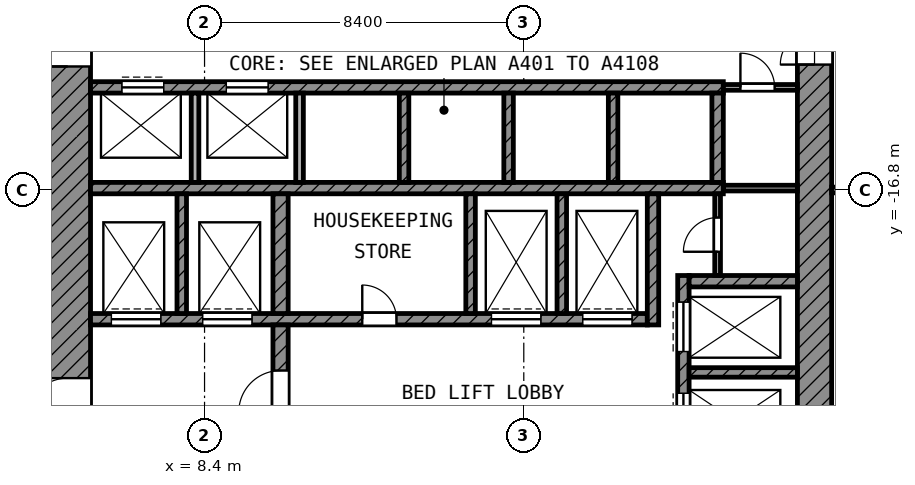
"""IFC4 building model, lengths in metres.
Left out: names, types, materials, properties, quantities, classifications, styles, units other than length and angle.
Written with IfcOpenShell. Run it as: python <this file> out.ifc"""

import sys

from ifc_helpers import new_model, si_unit, direction, frame, frame_2d, origin, place, context, subcontext, project, spatial, rectangle, extrude, element, fill, save


model = new_model("IFC4")
c1 = context("Model", 3, precision=1e-05, world=origin(), true_north=direction((0.0, 1.0)))
c2 = subcontext(c1, "Body", "Model", "MODEL_VIEW")
j1 = project(units=[si_unit("LENGTHUNIT", "METRE"), si_unit("PLANEANGLEUNIT", "RADIAN")], contexts=[c1])
p1 = place(None, origin())
s1 = spatial("IfcSite", under=j1, at=p1, CompositionType="ELEMENT")
p2 = place(p1, origin())
s2 = spatial("IfcBuilding", under=s1, at=p2, CompositionType="ELEMENT")
p3 = place(p2, frame((0.0, 0.0, 183.6)))
s3 = spatial("IfcBuildingStorey", under=s2, at=p3, CompositionType="ELEMENT", Elevation=183.6)
p4 = place(p3, frame((4.8, -24.9, 0.0), z_axis=(0.0, 0.0, 1.0), x_axis=(0.0, 1.0, 0.0)))
e1 = element("IfcWall", 1, at=p4, inside=s3, PredefinedType="SHEAR", context=c2, shape_type="SweptSolid", body=[
    extrude(rectangle(XDim=19.5, YDim=1.2, at=frame_2d((9.75, 0.0))), origin(), (0.0, 0.0, 1.0), 3.6),
])
p5 = place(p4, frame((11.35, 0.0, 0.0)))
e2 = element("IfcOpeningElement", 2, at=p5, cuts=e1, PredefinedType="OPENING", context=c2, shape_type="SweptSolid", body=[
    extrude(rectangle(XDim=1.1, YDim=2.1, at=frame_2d((0.55, 1.05))), frame((0.0, 0.61, 0.0), z_axis=(0.0, -1.0, 0.0), x_axis=(1.0, 0.0, 0.0)), (0.0, 0.0, 1.0), 1.22),
])
p6 = place(p4, frame((2.05, 0.0, 0.0)))
e3 = element("IfcOpeningElement", 3, at=p6, cuts=e1, PredefinedType="OPENING", context=c2, shape_type="SweptSolid", body=[
    extrude(rectangle(XDim=1.1, YDim=2.1, at=frame_2d((0.55, 1.05))), frame((0.0, 0.61, 0.0), z_axis=(0.0, -1.0, 0.0), x_axis=(1.0, 0.0, 0.0)), (0.0, 0.0, 1.0), 1.22),
])
p7 = place(p3, frame((24.45, -24.0, 0.0), z_axis=(0.0, 0.0, 1.0), x_axis=(0.0, 1.0, 0.0)))
e4 = element("IfcWall", 4, at=p7, inside=s3, PredefinedType="SHEAR", context=c2, shape_type="SweptSolid", body=[
    extrude(rectangle(XDim=18.6, YDim=0.9, at=frame_2d((9.3, 0.0))), origin(), (0.0, 0.0, 1.0), 3.6),
])
p8 = place(p7, frame((10.5, 0.0, 0.0)))
e5 = element("IfcOpeningElement", 5, at=p8, cuts=e4, PredefinedType="OPENING", context=c2, shape_type="SweptSolid", body=[
    extrude(rectangle(XDim=1.8, YDim=2.1, at=frame_2d((0.9, 1.05))), frame((0.0, 0.46, 0.0), z_axis=(0.0, -1.0, 0.0), x_axis=(1.0, 0.0, 0.0)), (0.0, 0.0, 1.0), 0.92),
])
p9 = place(p3, frame((5.4, -14.1, 0.0), z_axis=(0.0, 0.0, 1.0), x_axis=(1.0, 0.0, 0.0)))
e6 = element("IfcWall", 6, at=p9, inside=s3, PredefinedType="SHEAR", context=c2, shape_type="SweptSolid", body=[
    extrude(rectangle(XDim=16.65, YDim=0.3, at=frame_2d((8.325, 0.0))), origin(), (0.0, 0.0, 1.0), 3.6),
])
p10 = place(p9, frame((0.825, 0.0, 0.0)))
e7 = element("IfcOpeningElement", 7, at=p10, cuts=e6, PredefinedType="OPENING", context=c2, shape_type="SweptSolid", body=[
    extrude(rectangle(XDim=1.1, YDim=2.1, at=frame_2d((0.55, 1.05))), frame((0.0, 0.16, 0.0), z_axis=(0.0, -1.0, 0.0), x_axis=(1.0, 0.0, 0.0)), (0.0, 0.0, 1.0), 0.32),
])
p11 = place(p9, frame((3.575, 0.0, 0.0)))
e8 = element("IfcOpeningElement", 8, at=p11, cuts=e6, PredefinedType="OPENING", context=c2, shape_type="SweptSolid", body=[
    extrude(rectangle(XDim=1.1, YDim=2.1, at=frame_2d((0.55, 1.05))), frame((0.0, 0.16, 0.0), z_axis=(0.0, -1.0, 0.0), x_axis=(1.0, 0.0, 0.0)), (0.0, 0.0, 1.0), 0.32),
])
p12 = place(p3, frame((5.4, -16.75, 0.0), z_axis=(0.0, 0.0, 1.0), x_axis=(1.0, 0.0, 0.0)))
e9 = element("IfcWall", 9, at=p12, inside=s3, PredefinedType="SHEAR", context=c2, shape_type="SweptSolid", body=[
    extrude(rectangle(XDim=16.65, YDim=0.3, at=frame_2d((8.325, 0.0))), origin(), (0.0, 0.0, 1.0), 3.6),
])
p13 = place(p3, frame((5.4, -20.2, 0.0), z_axis=(0.0, 0.0, 1.0), x_axis=(1.0, 0.0, 0.0)))
e10 = element("IfcWall", 10, at=p13, inside=s3, PredefinedType="SHEAR", context=c2, shape_type="SweptSolid", body=[
    extrude(rectangle(XDim=14.65, YDim=0.3, at=frame_2d((7.325, 0.0))), origin(), (0.0, 0.0, 1.0), 3.6),
])
p14 = place(p13, frame((10.55, 0.0, 0.0)))
e11 = element("IfcOpeningElement", 11, at=p14, cuts=e10, PredefinedType="OPENING", context=c2, shape_type="SweptSolid", body=[
    extrude(rectangle(XDim=1.3, YDim=2.1, at=frame_2d((0.65, 1.05))), frame((0.0, 0.16, 0.0), z_axis=(0.0, -1.0, 0.0), x_axis=(1.0, 0.0, 0.0)), (0.0, 0.0, 1.0), 0.32),
])
p15 = place(p13, frame((12.95, 0.0, 0.0)))
e12 = element("IfcOpeningElement", 12, at=p15, cuts=e10, PredefinedType="OPENING", context=c2, shape_type="SweptSolid", body=[
    extrude(rectangle(XDim=1.3, YDim=2.1, at=frame_2d((0.65, 1.05))), frame((0.0, 0.16, 0.0), z_axis=(0.0, -1.0, 0.0), x_axis=(1.0, 0.0, 0.0)), (0.0, 0.0, 1.0), 0.32),
])
p16 = place(p13, frame((0.55, 0.0, 0.0)))
e13 = element("IfcOpeningElement", 13, at=p16, cuts=e10, PredefinedType="OPENING", context=c2, shape_type="SweptSolid", body=[
    extrude(rectangle(XDim=1.3, YDim=2.1, at=frame_2d((0.65, 1.05))), frame((0.0, 0.16, 0.0), z_axis=(0.0, -1.0, 0.0), x_axis=(1.0, 0.0, 0.0)), (0.0, 0.0, 1.0), 0.32),
])
p17 = place(p13, frame((2.95, 0.0, 0.0)))
e14 = element("IfcOpeningElement", 14, at=p17, cuts=e10, PredefinedType="OPENING", context=c2, shape_type="SweptSolid", body=[
    extrude(rectangle(XDim=1.3, YDim=2.1, at=frame_2d((0.65, 1.05))), frame((0.0, 0.16, 0.0), z_axis=(0.0, -1.0, 0.0), x_axis=(1.0, 0.0, 0.0)), (0.0, 0.0, 1.0), 0.32),
])
p18 = place(p13, frame((7.15, 0.0, 0.0)))
e15 = element("IfcOpeningElement", 15, at=p18, cuts=e10, PredefinedType="OPENING", context=c2, shape_type="SweptSolid", body=[
    extrude(rectangle(XDim=0.9, YDim=2.1, at=frame_2d((0.45, 1.05))), frame((0.0, 0.16, 0.0), z_axis=(0.0, -1.0, 0.0), x_axis=(1.0, 0.0, 0.0)), (0.0, 0.0, 1.0), 0.32),
])
p19 = place(p3, frame((10.4, -24.0, 0.0), z_axis=(0.0, 0.0, 1.0), x_axis=(0.0, 1.0, 0.0)))
e16 = element("IfcWall", 16, at=p19, inside=s3, PredefinedType="SHEAR", context=c2, shape_type="SweptSolid", body=[
    extrude(rectangle(XDim=3.65, YDim=0.4, at=frame_2d((1.825, 0.0))), origin(), (0.0, 0.0, 1.0), 3.6),
])
p20 = place(p19, frame((1.35, 0.0, 0.0)))
e17 = element("IfcOpeningElement", 17, at=p20, cuts=e16, PredefinedType="OPENING", context=c2, shape_type="SweptSolid", body=[
    extrude(rectangle(XDim=1.1, YDim=2.1, at=frame_2d((0.55, 1.05))), frame((0.0, 0.21, 0.0), z_axis=(0.0, -1.0, 0.0), x_axis=(1.0, 0.0, 0.0)), (0.0, 0.0, 1.0), 0.42),
])
p21 = place(p3, frame((10.4, -20.05, 0.0), z_axis=(0.0, 0.0, 1.0), x_axis=(0.0, 1.0, 0.0)))
e18 = element("IfcWall", 18, at=p21, inside=s3, PredefinedType="SHEAR", context=c2, shape_type="SweptSolid", body=[
    extrude(rectangle(XDim=3.15, YDim=0.4, at=frame_2d((1.575, 0.0))), origin(), (0.0, 0.0, 1.0), 3.6),
])
p22 = place(p3, frame((20.2, -20.35, 0.0), z_axis=(0.0, 0.0, 1.0), x_axis=(0.0, 1.0, 0.0)))
e19 = element("IfcWall", 19, at=p22, inside=s3, PredefinedType="SHEAR", context=c2, shape_type="SweptSolid", body=[
    extrude(rectangle(XDim=3.45, YDim=0.3, at=frame_2d((1.725, 0.0))), origin(), (0.0, 0.0, 1.0), 3.6),
])
p23 = place(p3, frame((21.9, -16.6, 0.0), z_axis=(0.0, 0.0, 1.0), x_axis=(0.0, 1.0, 0.0)))
e20 = element("IfcWall", 20, at=p23, inside=s3, PredefinedType="SHEAR", context=c2, shape_type="SweptSolid", body=[
    extrude(rectangle(XDim=2.35, YDim=0.3, at=frame_2d((1.175, 0.0))), origin(), (0.0, 0.0, 1.0), 3.6),
])
p24 = place(p3, frame((21.15, -19.2, 0.0), z_axis=(0.0, 0.0, 1.0), x_axis=(1.0, 0.0, 0.0)))
e21 = element("IfcWall", 21, at=p24, inside=s3, PredefinedType="SHEAR", context=c2, shape_type="SweptSolid", body=[
    extrude(rectangle(XDim=2.85, YDim=0.3, at=frame_2d((1.425, 0.0))), origin(), (0.0, 0.0, 1.0), 3.6),
])
p25 = place(p3, frame((21.0, -24.0, 0.0), z_axis=(0.0, 0.0, 1.0), x_axis=(0.0, 1.0, 0.0)))
e22 = element("IfcWall", 22, at=p25, inside=s3, PredefinedType="SHEAR", context=c2, shape_type="SweptSolid", body=[
    extrude(rectangle(XDim=4.95, YDim=0.3, at=frame_2d((2.475, 0.0))), origin(), (0.0, 0.0, 1.0), 3.6),
])
p26 = place(p25, frame((2.95, 0.0, 0.0)))
e23 = element("IfcOpeningElement", 23, at=p26, cuts=e22, PredefinedType="OPENING", context=c2, shape_type="SweptSolid", body=[
    extrude(rectangle(XDim=1.3, YDim=2.1, at=frame_2d((0.65, 1.05))), frame((0.0, 0.16, 0.0), z_axis=(0.0, -1.0, 0.0), x_axis=(1.0, 0.0, 0.0)), (0.0, 0.0, 1.0), 0.32),
])
p27 = place(p25, frame((0.55, 0.0, 0.0)))
e24 = element("IfcOpeningElement", 24, at=p27, cuts=e22, PredefinedType="OPENING", context=c2, shape_type="SweptSolid", body=[
    extrude(rectangle(XDim=1.3, YDim=2.1, at=frame_2d((0.65, 1.05))), frame((0.0, 0.16, 0.0), z_axis=(0.0, -1.0, 0.0), x_axis=(1.0, 0.0, 0.0)), (0.0, 0.0, 1.0), 0.32),
])
p28 = place(p3, frame((21.15, -21.6, 0.0), z_axis=(0.0, 0.0, 1.0), x_axis=(1.0, 0.0, 0.0)))
e25 = element("IfcWall", 25, at=p28, inside=s3, PredefinedType="SHEAR", context=c2, shape_type="SweptSolid", body=[
    extrude(rectangle(XDim=2.85, YDim=0.25, at=frame_2d((1.425, 0.0))), origin(), (0.0, 0.0, 1.0), 3.6),
])
for number, where, z_axis, x_axis in (
    (26, (7.8, -20.05, 0.0), (0.0, 0.0, 1.0), (0.0, 1.0, 0.0)),
    (27, (15.4, -20.05, 0.0), (0.0, 0.0, 1.0), (0.0, 1.0, 0.0)),
    (28, (17.8, -20.05, 0.0), (0.0, 0.0, 1.0), (0.0, 1.0, 0.0)),
):
    element("IfcWall", number, at=place(p3, frame(where, z_axis=z_axis, x_axis=x_axis)), inside=s3, PredefinedType="SHEAR", context=c2, shape_type="SweptSolid", body=[
        extrude(rectangle(XDim=3.15, YDim=0.25, at=frame_2d((1.575, 0.0))), origin(), (0.0, 0.0, 1.0), 3.6),
    ])
for number, where, z_axis, x_axis in (
    (29, (8.15, -16.6, 0.0), (0.0, 0.0, 1.0), (0.0, 1.0, 0.0)),
    (30, (10.9, -16.6, 0.0), (0.0, 0.0, 1.0), (0.0, 1.0, 0.0)),
):
    element("IfcWall", number, at=place(p3, frame(where, z_axis=z_axis, x_axis=x_axis)), inside=s3, PredefinedType="PARTITIONING", context=c2, shape_type="SweptSolid", body=[
        extrude(rectangle(XDim=2.35, YDim=0.2, at=frame_2d((1.175, 0.0))), origin(), (0.0, 0.0, 1.0), 3.6),
    ])
for number, where, z_axis, x_axis in (
    (31, (13.65, -16.6, 0.0), (0.0, 0.0, 1.0), (0.0, 1.0, 0.0)),
    (32, (16.4, -16.6, 0.0), (0.0, 0.0, 1.0), (0.0, 1.0, 0.0)),
    (33, (19.15, -16.6, 0.0), (0.0, 0.0, 1.0), (0.0, 1.0, 0.0)),
):
    element("IfcWall", number, at=place(p3, frame(where, z_axis=z_axis, x_axis=x_axis)), inside=s3, PredefinedType="SHEAR", context=c2, shape_type="SweptSolid", body=[
        extrude(rectangle(XDim=2.35, YDim=0.25, at=frame_2d((1.175, 0.0))), origin(), (0.0, 0.0, 1.0), 3.6),
    ])
p29 = place(p3, frame((21.9, -19.05, 0.0), z_axis=(0.0, 0.0, 1.0), x_axis=(0.0, 1.0, 0.0)))
e34 = element("IfcWall", 34, at=p29, inside=s3, PredefinedType="PARTITIONING", context=c2, shape_type="SweptSolid", body=[
    extrude(rectangle(XDim=2.15, YDim=0.15, at=frame_2d((1.075, 0.0))), origin(), (0.0, 0.0, 1.0), 3.6),
])
p30 = place(p29, frame((0.625, 0.0, 0.0)))
e35 = element("IfcOpeningElement", 35, at=p30, cuts=e34, PredefinedType="OPENING", context=c2, shape_type="SweptSolid", body=[
    extrude(rectangle(XDim=0.9, YDim=2.1, at=frame_2d((0.45, 1.05))), frame((0.0, 0.085, 0.0), z_axis=(0.0, -1.0, 0.0), x_axis=(1.0, 0.0, 0.0)), (0.0, 0.0, 1.0), 0.17),
])
p31 = place(p3, frame((22.05, -16.75, 0.0), z_axis=(0.0, 0.0, 1.0), x_axis=(1.0, 0.0, 0.0)))
e36 = element("IfcWall", 36, at=p31, inside=s3, PredefinedType="PARTITIONING", context=c2, shape_type="SweptSolid", body=[
    extrude(rectangle(XDim=1.95, YDim=0.15, at=frame_2d((0.975, 0.0))), origin(), (0.0, 0.0, 1.0), 3.6),
])
p32 = place(p3, frame((22.05, -14.1, 0.0), z_axis=(0.0, 0.0, 1.0), x_axis=(1.0, 0.0, 0.0)))
e37 = element("IfcWall", 37, at=p32, inside=s3, PredefinedType="PARTITIONING", context=c2, shape_type="SweptSolid", body=[
    extrude(rectangle(XDim=1.95, YDim=0.15, at=frame_2d((0.975, 0.0))), origin(), (0.0, 0.0, 1.0), 3.6),
])
p33 = place(p32, frame((0.45, 0.0, 0.0)))
e38 = element("IfcOpeningElement", 38, at=p33, cuts=e37, PredefinedType="OPENING", context=c2, shape_type="SweptSolid", body=[
    extrude(rectangle(XDim=0.9, YDim=2.1, at=frame_2d((0.45, 1.05))), frame((0.0, 0.085, 0.0), z_axis=(0.0, -1.0, 0.0), x_axis=(1.0, 0.0, 0.0)), (0.0, 0.0, 1.0), 0.17),
])
p34 = place(p3, frame((24.9, -16.8, 0.0), z_axis=(0.0, 0.0, 1.0), x_axis=(1.0, 0.0, 0.0)))
e39 = element("IfcWall", 39, at=p34, inside=s3, PredefinedType="PARTITIONING", context=c2, shape_type="SweptSolid", body=[
    extrude(rectangle(XDim=42.22, YDim=0.15, at=frame_2d((21.11, 0.0))), origin(), (0.0, 0.0, 1.0), 3.6),
])
p35 = place(p34, frame((1.65, 0.0, 0.0)))
e40 = element("IfcOpeningElement", 40, at=p35, cuts=e39, PredefinedType="OPENING", context=c2, shape_type="SweptSolid", body=[
    extrude(rectangle(XDim=1.5, YDim=2.1, at=frame_2d((0.75, 1.05))), frame((0.0, 0.085, 0.0), z_axis=(0.0, -1.0, 0.0), x_axis=(1.0, 0.0, 0.0)), (0.0, 0.0, 1.0), 0.17),
])
p36 = place(p34, frame((6.1, 0.0, 0.0)))
e41 = element("IfcOpeningElement", 41, at=p36, cuts=e39, PredefinedType="OPENING", context=c2, shape_type="SweptSolid", body=[
    extrude(rectangle(XDim=1.0, YDim=2.1, at=frame_2d((0.5, 1.05))), frame((0.0, 0.085, 0.0), z_axis=(0.0, -1.0, 0.0), x_axis=(1.0, 0.0, 0.0)), (0.0, 0.0, 1.0), 0.17),
])
p37 = place(p34, frame((10.2, 0.0, 0.0)))
e42 = element("IfcOpeningElement", 42, at=p37, cuts=e39, PredefinedType="OPENING", context=c2, shape_type="SweptSolid", body=[
    extrude(rectangle(XDim=1.2, YDim=2.1, at=frame_2d((0.6, 1.05))), frame((0.0, 0.085, 0.0), z_axis=(0.0, -1.0, 0.0), x_axis=(1.0, 0.0, 0.0)), (0.0, 0.0, 1.0), 0.17),
])
p38 = place(p34, frame((20.34, 0.0, 0.0)))
e43 = element("IfcOpeningElement", 43, at=p38, cuts=e39, PredefinedType="OPENING", context=c2, shape_type="SweptSolid", body=[
    extrude(rectangle(XDim=1.2, YDim=2.1, at=frame_2d((0.6, 1.05))), frame((0.0, 0.085, 0.0), z_axis=(0.0, -1.0, 0.0), x_axis=(1.0, 0.0, 0.0)), (0.0, 0.0, 1.0), 0.17),
])
p39 = place(p34, frame((18.78, 0.0, 0.0)))
e44 = element("IfcOpeningElement", 44, at=p39, cuts=e39, PredefinedType="OPENING", context=c2, shape_type="SweptSolid", body=[
    extrude(rectangle(XDim=1.2, YDim=2.1, at=frame_2d((0.6, 1.05))), frame((0.0, 0.085, 0.0), z_axis=(0.0, -1.0, 0.0), x_axis=(1.0, 0.0, 0.0)), (0.0, 0.0, 1.0), 0.17),
])
p40 = place(p34, frame((28.0, 0.0, 0.0)))
e45 = element("IfcOpeningElement", 45, at=p40, cuts=e39, PredefinedType="OPENING", context=c2, shape_type="SweptSolid", body=[
    extrude(rectangle(XDim=1.2, YDim=2.1, at=frame_2d((0.6, 1.05))), frame((0.0, 0.085, 0.0), z_axis=(0.0, -1.0, 0.0), x_axis=(1.0, 0.0, 0.0)), (0.0, 0.0, 1.0), 0.17),
])
p41 = place(p34, frame((26.48, 0.0, 0.0)))
e46 = element("IfcOpeningElement", 46, at=p41, cuts=e39, PredefinedType="OPENING", context=c2, shape_type="SweptSolid", body=[
    extrude(rectangle(XDim=1.2, YDim=2.1, at=frame_2d((0.6, 1.05))), frame((0.0, 0.085, 0.0), z_axis=(0.0, -1.0, 0.0), x_axis=(1.0, 0.0, 0.0)), (0.0, 0.0, 1.0), 0.17),
])
p42 = place(p34, frame((32.1, 0.0, 0.0)))
e47 = element("IfcOpeningElement", 47, at=p42, cuts=e39, PredefinedType="OPENING", context=c2, shape_type="SweptSolid", body=[
    extrude(rectangle(XDim=1.2, YDim=2.1, at=frame_2d((0.6, 1.05))), frame((0.0, 0.085, 0.0), z_axis=(0.0, -1.0, 0.0), x_axis=(1.0, 0.0, 0.0)), (0.0, 0.0, 1.0), 0.17),
])
p43 = place(p34, frame((37.35, 0.0, 0.0)))
e48 = element("IfcOpeningElement", 48, at=p43, cuts=e39, PredefinedType="OPENING", context=c2, shape_type="SweptSolid", body=[
    extrude(rectangle(XDim=1.5, YDim=2.1, at=frame_2d((0.75, 1.05))), frame((0.0, 0.085, 0.0), z_axis=(0.0, -1.0, 0.0), x_axis=(1.0, 0.0, 0.0)), (0.0, 0.0, 1.0), 0.17),
])
p44 = place(p10, origin())
e49 = element("IfcDoor", 49, at=p44, inside=s3, OperationType="DOUBLE_DOOR_SLIDING", PredefinedType="DOOR", context=c2, shape_type="SweptSolid", body=[
    extrude(rectangle(XDim=1.1, YDim=2.1, at=frame_2d((0.55, 1.05))), frame((0.0, 0.025, 0.0), z_axis=(0.0, -1.0, 0.0), x_axis=(1.0, 0.0, 0.0)), (0.0, 0.0, 1.0), 0.05),
])
fill(e7, e49)
p45 = place(p11, origin())
e50 = element("IfcDoor", 50, at=p45, inside=s3, OperationType="DOUBLE_DOOR_SLIDING", PredefinedType="DOOR", context=c2, shape_type="SweptSolid", body=[
    extrude(rectangle(XDim=1.1, YDim=2.1, at=frame_2d((0.55, 1.05))), frame((0.0, 0.025, 0.0), z_axis=(0.0, -1.0, 0.0), x_axis=(1.0, 0.0, 0.0)), (0.0, 0.0, 1.0), 0.05),
])
fill(e8, e50)
p46 = place(p26, origin())
e51 = element("IfcDoor", 51, at=p46, inside=s3, OperationType="DOUBLE_DOOR_SLIDING", PredefinedType="DOOR", context=c2, shape_type="SweptSolid", body=[
    extrude(rectangle(XDim=1.3, YDim=2.1, at=frame_2d((0.65, 1.05))), frame((0.0, 0.025, 0.0), z_axis=(0.0, -1.0, 0.0), x_axis=(1.0, 0.0, 0.0)), (0.0, 0.0, 1.0), 0.05),
])
fill(e23, e51)
p47 = place(p27, origin())
e52 = element("IfcDoor", 52, at=p47, inside=s3, OperationType="DOUBLE_DOOR_SLIDING", PredefinedType="DOOR", context=c2, shape_type="SweptSolid", body=[
    extrude(rectangle(XDim=1.3, YDim=2.1, at=frame_2d((0.65, 1.05))), frame((0.0, 0.025, 0.0), z_axis=(0.0, -1.0, 0.0), x_axis=(1.0, 0.0, 0.0)), (0.0, 0.0, 1.0), 0.05),
])
fill(e24, e52)
p48 = place(p14, origin())
e53 = element("IfcDoor", 53, at=p48, inside=s3, OperationType="DOUBLE_DOOR_SLIDING", PredefinedType="DOOR", context=c2, shape_type="SweptSolid", body=[
    extrude(rectangle(XDim=1.3, YDim=2.1, at=frame_2d((0.65, 1.05))), frame((0.0, 0.025, 0.0), z_axis=(0.0, -1.0, 0.0), x_axis=(1.0, 0.0, 0.0)), (0.0, 0.0, 1.0), 0.05),
])
fill(e11, e53)
p49 = place(p15, origin())
e54 = element("IfcDoor", 54, at=p49, inside=s3, OperationType="DOUBLE_DOOR_SLIDING", PredefinedType="DOOR", context=c2, shape_type="SweptSolid", body=[
    extrude(rectangle(XDim=1.3, YDim=2.1, at=frame_2d((0.65, 1.05))), frame((0.0, 0.025, 0.0), z_axis=(0.0, -1.0, 0.0), x_axis=(1.0, 0.0, 0.0)), (0.0, 0.0, 1.0), 0.05),
])
fill(e12, e54)
p50 = place(p16, origin())
e55 = element("IfcDoor", 55, at=p50, inside=s3, OperationType="DOUBLE_DOOR_SLIDING", PredefinedType="DOOR", context=c2, shape_type="SweptSolid", body=[
    extrude(rectangle(XDim=1.3, YDim=2.1, at=frame_2d((0.65, 1.05))), frame((0.0, 0.025, 0.0), z_axis=(0.0, -1.0, 0.0), x_axis=(1.0, 0.0, 0.0)), (0.0, 0.0, 1.0), 0.05),
])
fill(e13, e55)
p51 = place(p17, origin())
e56 = element("IfcDoor", 56, at=p51, inside=s3, OperationType="DOUBLE_DOOR_SLIDING", PredefinedType="DOOR", context=c2, shape_type="SweptSolid", body=[
    extrude(rectangle(XDim=1.3, YDim=2.1, at=frame_2d((0.65, 1.05))), frame((0.0, 0.025, 0.0), z_axis=(0.0, -1.0, 0.0), x_axis=(1.0, 0.0, 0.0)), (0.0, 0.0, 1.0), 0.05),
])
fill(e14, e56)
p52 = place(p5, origin())
e57 = element("IfcDoor", 57, at=p52, inside=s3, OperationType="SINGLE_SWING_LEFT", PredefinedType="DOOR", context=c2, shape_type="SweptSolid", body=[
    extrude(rectangle(XDim=1.1, YDim=2.1, at=frame_2d((0.55, 1.05))), frame((0.0, 0.025, 0.0), z_axis=(0.0, -1.0, 0.0), x_axis=(1.0, 0.0, 0.0)), (0.0, 0.0, 1.0), 0.05),
])
fill(e2, e57)
p53 = place(p6, origin())
e58 = element("IfcDoor", 58, at=p53, inside=s3, OperationType="SINGLE_SWING_LEFT", PredefinedType="DOOR", context=c2, shape_type="SweptSolid", body=[
    extrude(rectangle(XDim=1.1, YDim=2.1, at=frame_2d((0.55, 1.05))), frame((0.0, 0.025, 0.0), z_axis=(0.0, -1.0, 0.0), x_axis=(1.0, 0.0, 0.0)), (0.0, 0.0, 1.0), 0.05),
])
fill(e3, e58)
p54 = place(p20, origin())
e59 = element("IfcDoor", 59, at=p54, inside=s3, OperationType="SINGLE_SWING_LEFT", PredefinedType="DOOR", context=c2, shape_type="SweptSolid", body=[
    extrude(rectangle(XDim=1.1, YDim=2.1, at=frame_2d((0.55, 1.05))), frame((0.0, 0.025, 0.0), z_axis=(0.0, -1.0, 0.0), x_axis=(1.0, 0.0, 0.0)), (0.0, 0.0, 1.0), 0.05),
])
fill(e17, e59)
p55 = place(p8, origin())
e60 = element("IfcDoor", 60, at=p55, inside=s3, OperationType="DOUBLE_DOOR_SINGLE_SWING", PredefinedType="DOOR", context=c2, shape_type="SweptSolid", body=[
    extrude(rectangle(XDim=1.8, YDim=2.1, at=frame_2d((0.9, 1.05))), frame((0.0, 0.025, 0.0), z_axis=(0.0, -1.0, 0.0), x_axis=(1.0, 0.0, 0.0)), (0.0, 0.0, 1.0), 0.05),
])
fill(e5, e60)
p56 = place(p33, origin())
e61 = element("IfcDoor", 61, at=p56, inside=s3, OperationType="SINGLE_SWING_LEFT", PredefinedType="DOOR", context=c2, shape_type="SweptSolid", body=[
    extrude(rectangle(XDim=0.9, YDim=2.1, at=frame_2d((0.45, 1.05))), frame((0.0, 0.025, 0.0), z_axis=(0.0, -1.0, 0.0), x_axis=(1.0, 0.0, 0.0)), (0.0, 0.0, 1.0), 0.05),
])
fill(e38, e61)
p57 = place(p30, origin())
e62 = element("IfcDoor", 62, at=p57, inside=s3, OperationType="SINGLE_SWING_LEFT", PredefinedType="DOOR", context=c2, shape_type="SweptSolid", body=[
    extrude(rectangle(XDim=0.9, YDim=2.1, at=frame_2d((0.45, 1.05))), frame((0.0, 0.025, 0.0), z_axis=(0.0, -1.0, 0.0), x_axis=(1.0, 0.0, 0.0)), (0.0, 0.0, 1.0), 0.05),
])
fill(e35, e62)
p58 = place(p18, origin())
e63 = element("IfcDoor", 63, at=p58, inside=s3, OperationType="SINGLE_SWING_LEFT", PredefinedType="DOOR", context=c2, shape_type="SweptSolid", body=[
    extrude(rectangle(XDim=0.9, YDim=2.1, at=frame_2d((0.45, 1.05))), frame((0.0, 0.025, 0.0), z_axis=(0.0, -1.0, 0.0), x_axis=(1.0, 0.0, 0.0)), (0.0, 0.0, 1.0), 0.05),
])
fill(e15, e63)
save(model, sys.argv[1])
